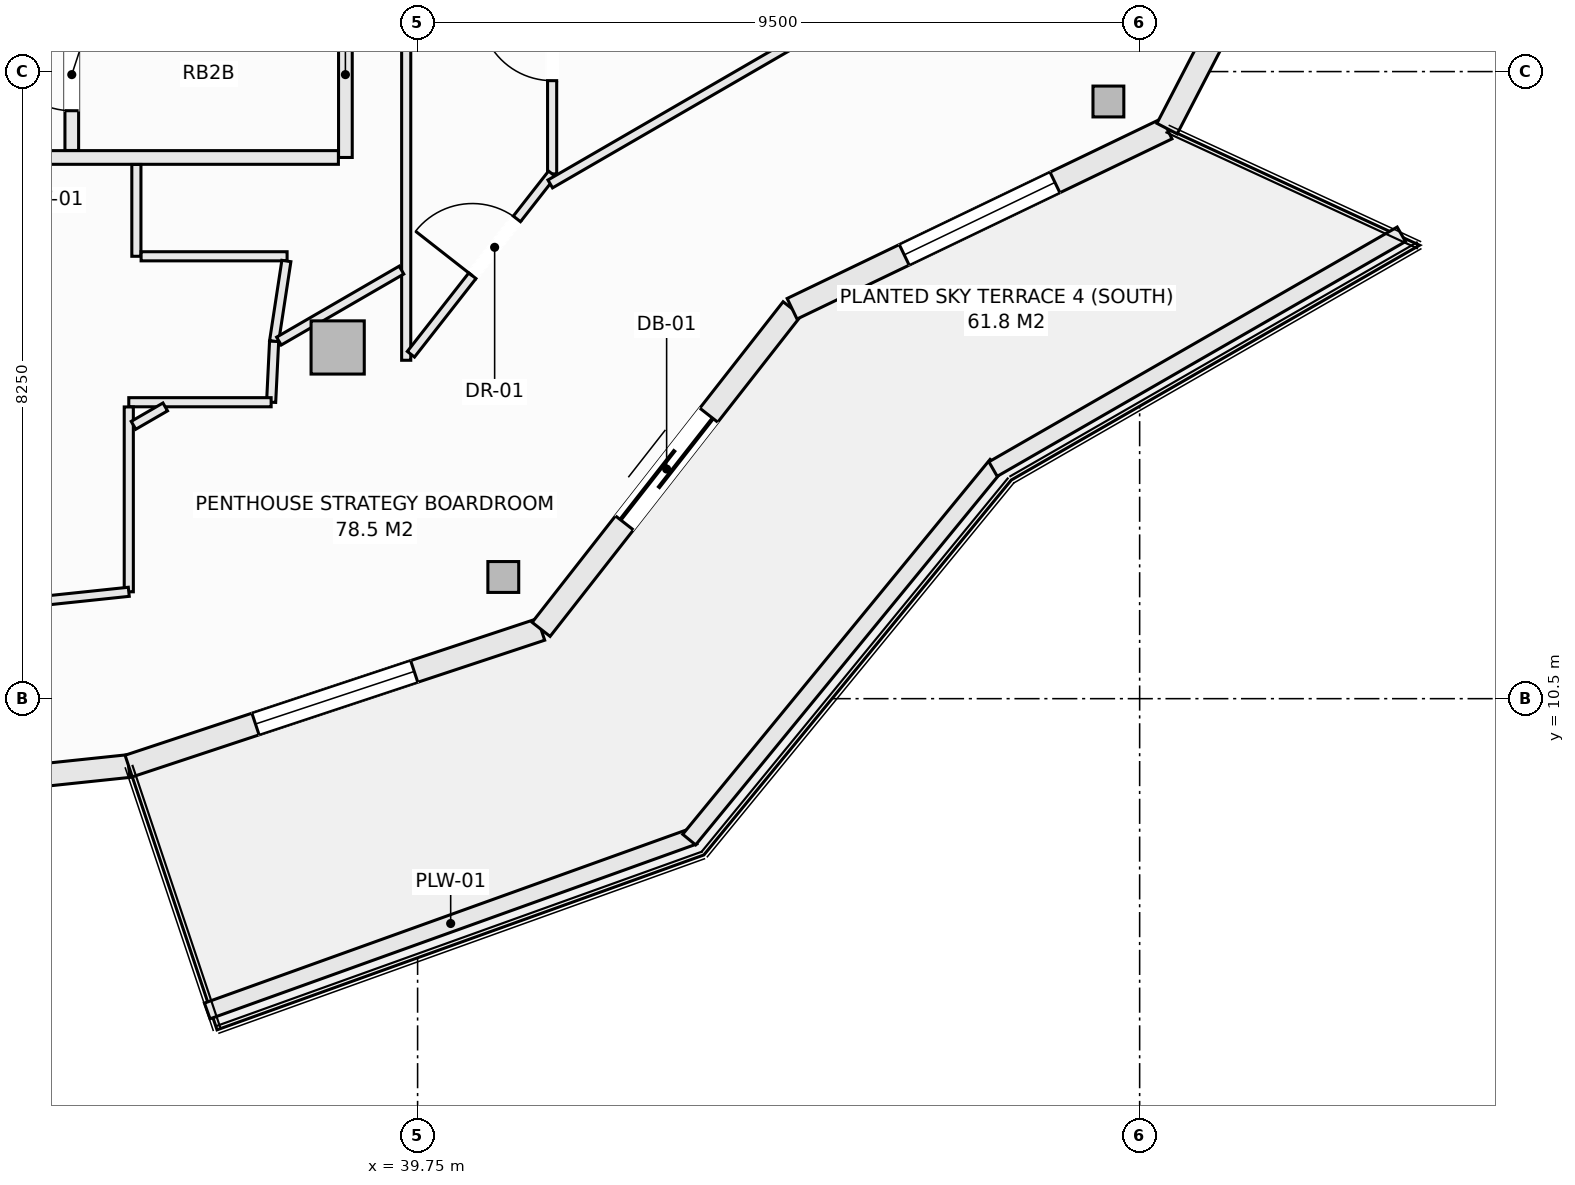
"""IFC4 building model, lengths in metres.
Left out: names, types, materials, properties, quantities, classifications, styles, units other than length and angle.
Written with IfcOpenShell. Run it as: python <this file> out.ifc"""

import sys

from ifc_helpers import new_model, si_unit, direction, frame, frame_2d, origin, origin_2d, place, context, subcontext, project, spatial, rectangle, hollow_rectangle, extrude, element, fill, save


model = new_model("IFC4")
c1 = context("Model", 3, precision=1e-05, world=origin(), true_north=direction((0.0, 1.0)))
c2 = subcontext(c1, "Body", "Model", "MODEL_VIEW")
j1 = project(units=[si_unit("LENGTHUNIT", "METRE"), si_unit("PLANEANGLEUNIT", "RADIAN")], contexts=[c1])
p1 = place(None, origin())
s1 = spatial("IfcSite", under=j1, at=p1, CompositionType="ELEMENT")
p2 = place(p1, origin())
s2 = spatial("IfcBuilding", under=s1, at=p2, CompositionType="ELEMENT")
p3 = place(p2, frame((0.0, 0.0, 249.2)))
s3 = spatial("IfcBuildingStorey", under=s2, at=p3, CompositionType="ELEMENT", Elevation=249.2)
for number, where, z_axis, x_axis in (
    (1, (40.878, 12.101, -0.27), (0.0, 0.0, 1.0), (1.0, 0.0, 0.0)),
    (2, (48.839, 18.356, -0.27), (0.0, 0.0, 1.0), (1.0, 0.0, 0.0)),
):
    element("IfcColumn", number, at=place(p3, frame(where, z_axis=z_axis, x_axis=x_axis)), inside=s3, PredefinedType="COLUMN", context=c2, shape_type="SweptSolid", body=[
        extrude(hollow_rectangle(XDim=0.406, YDim=0.406, WallThickness=0.016, at=origin_2d()), origin(), (0.0, 0.0, 1.0), 3.3),
    ])
p4 = place(p3, frame((38.698, 15.121, -0.27), z_axis=(0.0, 0.0, 1.0), x_axis=(1.0, 0.0, 0.0)))
e3 = element("IfcColumn", 3, at=p4, inside=s3, PredefinedType="COLUMN", context=c2, shape_type="SweptSolid", body=[
    extrude(rectangle(XDim=0.7, YDim=0.7, at=origin_2d()), origin(), (0.0, 0.0, 1.0), 3.3),
])
p5 = place(p3, frame((30.125, 9.0, 0.0), z_axis=(0.0, 0.0, 1.0), x_axis=(0.994500425783, 0.10473253132, 0.0)))
e4 = element("IfcWall", 4, at=p5, inside=s3, PredefinedType="SOLIDWALL", context=c2, shape_type="SweptSolid", body=[
    extrude(rectangle(XDim=5.856, YDim=0.3, at=frame_2d((2.928, 0.0))), origin(), (0.0, 0.0, 1.0), 2.605),
])
p6 = place(p5, frame((1.828, 0.0, 0.72)))
e5 = element("IfcOpeningElement", 5, at=p6, cuts=e4, PredefinedType="OPENING", context=c2, shape_type="SweptSolid", body=[
    extrude(rectangle(XDim=2.2, YDim=1.65, at=frame_2d((1.1, 0.825))), frame((0.0, 0.16, 0.0), z_axis=(0.0, -1.0, 0.0), x_axis=(1.0, 0.0, 0.0)), (0.0, 0.0, 1.0), 0.32),
])
p7 = place(p3, frame((35.948, 9.613, 0.0), z_axis=(0.0, 0.0, 1.0), x_axis=(0.949232769585, 0.314574552605, 0.0)))
e6 = element("IfcWall", 6, at=p7, inside=s3, PredefinedType="SOLIDWALL", context=c2, shape_type="SweptSolid", body=[
    extrude(rectangle(XDim=5.717, YDim=0.3, at=frame_2d((2.858, 0.0))), origin(), (0.0, 0.0, 1.0), 2.605),
])
p8 = place(p7, frame((1.758, 0.0, 0.72)))
e7 = element("IfcOpeningElement", 7, at=p8, cuts=e6, PredefinedType="OPENING", context=c2, shape_type="SweptSolid", body=[
    extrude(rectangle(XDim=2.2, YDim=1.65, at=frame_2d((1.1, 0.825))), frame((0.0, 0.16, 0.0), z_axis=(0.0, -1.0, 0.0), x_axis=(1.0, 0.0, 0.0)), (0.0, 0.0, 1.0), 0.32),
])
p9 = place(p3, frame((41.375, 11.412, 0.0), z_axis=(0.0, 0.0, 1.0), x_axis=(0.61644588519, 0.787397276241, 0.0)))
e8 = element("IfcWall", 8, at=p9, inside=s3, PredefinedType="SOLIDWALL", context=c2, shape_type="SweptSolid", body=[
    extrude(rectangle(XDim=5.357, YDim=0.3, at=frame_2d((2.678, 0.0))), origin(), (0.0, 0.0, 1.0), 2.605),
])
p10 = place(p9, frame((1.779, 0.0, 0.0)))
e9 = element("IfcOpeningElement", 9, at=p10, cuts=e8, PredefinedType="OPENING", context=c2, shape_type="SweptSolid", body=[
    extrude(rectangle(XDim=1.8, YDim=2.25, at=frame_2d((0.9, 1.125))), frame((0.0, 0.16, 0.0), z_axis=(0.0, -1.0, 0.0), x_axis=(1.0, 0.0, 0.0)), (0.0, 0.0, 1.0), 0.32),
])
p11 = place(p3, frame((44.677, 15.63, 0.0), z_axis=(0.0, 0.0, 1.0), x_axis=(0.901355238351, 0.433080517106, 0.0)))
e10 = element("IfcWall", 10, at=p11, inside=s3, PredefinedType="SOLIDWALL", context=c2, shape_type="SweptSolid", body=[
    extrude(rectangle(XDim=5.473, YDim=0.3, at=frame_2d((2.737, 0.0))), origin(), (0.0, 0.0, 1.0), 2.605),
])
p12 = place(p11, frame((1.637, 0.0, 0.72)))
e11 = element("IfcOpeningElement", 11, at=p12, cuts=e10, PredefinedType="OPENING", context=c2, shape_type="SweptSolid", body=[
    extrude(rectangle(XDim=2.2, YDim=1.65, at=frame_2d((1.1, 0.825))), frame((0.0, 0.16, 0.0), z_axis=(0.0, -1.0, 0.0), x_axis=(1.0, 0.0, 0.0)), (0.0, 0.0, 1.0), 0.32),
])
p13 = place(p3, frame((49.611, 18.0, 0.0), z_axis=(0.0, 0.0, 1.0), x_axis=(0.459793771602, 0.888025724625, 0.0)))
e12 = element("IfcWall", 12, at=p13, inside=s3, PredefinedType="SOLIDWALL", context=c2, shape_type="SweptSolid", body=[
    extrude(rectangle(XDim=4.889, YDim=0.3, at=frame_2d((2.444, 0.0))), origin(), (0.0, 0.0, 1.0), 2.605),
])
p14 = place(p13, frame((1.344, 0.0, 0.72)))
e13 = element("IfcOpeningElement", 13, at=p14, cuts=e12, PredefinedType="OPENING", context=c2, shape_type="SweptSolid", body=[
    extrude(rectangle(XDim=2.2, YDim=1.65, at=frame_2d((1.1, 0.825))), frame((0.0, 0.16, 0.0), z_axis=(0.0, -1.0, 0.0), x_axis=(1.0, 0.0, 0.0)), (0.0, 0.0, 1.0), 0.32),
])
p15 = place(p3, frame((36.982, 6.392, 0.0), z_axis=(0.0, 0.0, 1.0), x_axis=(0.941139090914, 0.338019543152, 0.0)))
e14 = element("IfcWall", 14, at=p15, inside=s3, PredefinedType="PARAPET", context=c2, shape_type="SweptSolid", body=[
    extrude(rectangle(XDim=6.807, YDim=0.22, at=frame_2d((3.403, 0.0))), origin(), (0.0, 0.0, 1.0), 0.52),
])
p16 = place(p3, frame((43.323, 8.646, 0.0), z_axis=(0.0, 0.0, 1.0), x_axis=(0.63407318032, 0.77327304492, 0.0)))
e15 = element("IfcWall", 15, at=p16, inside=s3, PredefinedType="PARAPET", context=c2, shape_type="SweptSolid", body=[
    extrude(rectangle(XDim=6.379, YDim=0.22, at=frame_2d((3.189, 0.0))), origin(), (0.0, 0.0, 1.0), 0.52),
])
p17 = place(p3, frame((47.321, 13.521, 0.0), z_axis=(0.0, 0.0, 1.0), x_axis=(0.866901621005, 0.49847926687, 0.0)))
e16 = element("IfcWall", 16, at=p17, inside=s3, PredefinedType="PARAPET", context=c2, shape_type="SweptSolid", body=[
    extrude(rectangle(XDim=6.197, YDim=0.22, at=frame_2d((3.098, 0.0))), origin(), (0.0, 0.0, 1.0), 0.52),
])
p18 = place(p3, frame((38.8, 17.62, 0.0), z_axis=(0.0, 0.0, 1.0), x_axis=(0.0, 1.0, 0.0)))
e17 = element("IfcWall", 17, at=p18, inside=s3, PredefinedType="SOLIDWALL", context=c2, shape_type="SweptSolid", body=[
    extrude(rectangle(XDim=2.18, YDim=0.18, at=frame_2d((1.09, 0.0))), origin(), (0.0, 0.0, 1.0), 3.03),
])
p19 = place(p3, frame((30.062, 17.62, 0.0), z_axis=(0.0, 0.0, 1.0), x_axis=(1.0, 0.0, 0.0)))
e18 = element("IfcWall", 18, at=p19, inside=s3, PredefinedType="SOLIDWALL", context=c2, shape_type="SweptSolid", body=[
    extrude(rectangle(XDim=8.646, YDim=0.18, at=frame_2d((4.323, 0.0))), origin(), (0.0, 0.0, 1.0), 3.03),
])
p20 = place(p19, frame((2.299, 0.0, 0.0)))
e19 = element("IfcOpeningElement", 19, at=p20, cuts=e18, PredefinedType="OPENING", context=c2, shape_type="SweptSolid", body=[
    extrude(rectangle(XDim=0.95, YDim=2.1, at=frame_2d((0.475, 1.05))), frame((0.0, 0.1, 0.0), z_axis=(0.0, -1.0, 0.0), x_axis=(1.0, 0.0, 0.0)), (0.0, 0.0, 1.0), 0.2),
])
p21 = place(p3, frame((35.2, 17.712, 0.0), z_axis=(0.0, 0.0, 1.0), x_axis=(0.0, 1.0, 0.0)))
e20 = element("IfcWall", 20, at=p21, inside=s3, PredefinedType="SOLIDWALL", context=c2, shape_type="SweptSolid", body=[
    extrude(rectangle(XDim=1.996, YDim=0.18, at=frame_2d((0.998, 0.0))), origin(), (0.0, 0.0, 1.0), 3.03),
])
p22 = place(p21, frame((0.523, 0.0, 0.0)))
e21 = element("IfcOpeningElement", 21, at=p22, cuts=e20, PredefinedType="OPENING", context=c2, shape_type="SweptSolid", body=[
    extrude(rectangle(XDim=0.95, YDim=2.1, at=frame_2d((0.475, 1.05))), frame((0.0, 0.1, 0.0), z_axis=(0.0, -1.0, 0.0), x_axis=(1.0, 0.0, 0.0)), (0.0, 0.0, 1.0), 0.2),
])
p23 = place(p3, frame((39.6, 14.952, 0.0), z_axis=(0.0, 0.0, 1.0), x_axis=(0.0, 1.0, 0.0)))
e22 = element("IfcWall", 22, at=p23, inside=s3, PredefinedType="PARTITIONING", context=c2, shape_type="SweptSolid", body=[
    extrude(rectangle(XDim=8.068, YDim=0.12, at=frame_2d((4.034, 0.0))), origin(), (0.0, 0.0, 1.0), 2.478),
])
p24 = place(p3, frame((41.52, 17.404, 0.0), z_axis=(0.0, 0.0, 1.0), x_axis=(0.0, 1.0, 0.0)))
e23 = element("IfcWall", 23, at=p24, inside=s3, PredefinedType="PARTITIONING", context=c2, shape_type="SweptSolid", body=[
    extrude(rectangle(XDim=3.403, YDim=0.12, at=frame_2d((1.701, 0.0))), origin(), (0.0, 0.0, 1.0), 3.03),
])
p25 = place(p24, frame((1.227, 0.0, 0.0)))
e24 = element("IfcOpeningElement", 24, at=p25, cuts=e23, PredefinedType="OPENING", context=c2, shape_type="SweptSolid", body=[
    extrude(rectangle(XDim=0.95, YDim=2.1, at=frame_2d((0.475, 1.05))), frame((0.0, 0.07, 0.0), z_axis=(0.0, -1.0, 0.0), x_axis=(1.0, 0.0, 0.0)), (0.0, 0.0, 1.0), 0.14),
])
p26 = place(p3, frame((39.662, 15.031, 0.0), z_axis=(0.0, 0.0, 1.0), x_axis=(0.616500468458, 0.787354540465, 0.0)))
e25 = element("IfcWall", 25, at=p26, inside=s3, PredefinedType="PARTITIONING", context=c2, shape_type="SweptSolid", body=[
    extrude(rectangle(XDim=3.014, YDim=0.12, at=frame_2d((1.507, 0.0))), origin(), (0.0, 0.0, 1.0), 3.03),
])
p27 = place(p26, frame((1.312, 0.0, 0.0)))
e26 = element("IfcOpeningElement", 26, at=p27, cuts=e25, PredefinedType="OPENING", context=c2, shape_type="SweptSolid", body=[
    extrude(rectangle(XDim=0.95, YDim=2.1, at=frame_2d((0.475, 1.05))), frame((0.0, 0.07, 0.0), z_axis=(0.0, -1.0, 0.0), x_axis=(1.0, 0.0, 0.0)), (0.0, 0.0, 1.0), 0.14),
])
p28 = place(p3, frame((36.05, 16.32, 0.0), z_axis=(0.0, 0.0, 1.0), x_axis=(0.0, 1.0, 0.0)))
e27 = element("IfcWall", 27, at=p28, inside=s3, PredefinedType="PARTITIONING", context=c2, shape_type="SweptSolid", body=[
    extrude(rectangle(XDim=1.208, YDim=0.12, at=frame_2d((0.604, 0.0))), origin(), (0.0, 0.0, 1.0), 3.03),
])
p29 = place(p3, frame((36.112, 16.32, 0.0), z_axis=(0.0, 0.0, 1.0), x_axis=(1.0, 0.0, 0.0)))
e28 = element("IfcWall", 28, at=p29, inside=s3, PredefinedType="PARTITIONING", context=c2, shape_type="SweptSolid", body=[
    extrude(rectangle(XDim=1.921, YDim=0.12, at=frame_2d((0.96, 0.0))), origin(), (0.0, 0.0, 1.0), 3.03),
])
p30 = place(p3, frame((37.862, 15.201, 0.0), z_axis=(0.0, 0.0, 1.0), x_axis=(0.150907653202, 0.988547864398, 0.0)))
e29 = element("IfcWall", 29, at=p30, inside=s3, PredefinedType="PARTITIONING", context=c2, shape_type="SweptSolid", body=[
    extrude(rectangle(XDim=1.069, YDim=0.12, at=frame_2d((0.535, 0.0))), origin(), (0.0, 0.0, 1.0), 3.03),
])
p31 = place(p3, frame((37.823, 14.4, 0.0), z_axis=(0.0, 0.0, 1.0), x_axis=(0.04870773904, 0.998813073682, 0.0)))
e30 = element("IfcWall", 30, at=p31, inside=s3, PredefinedType="PARTITIONING", context=c2, shape_type="SweptSolid", body=[
    extrude(rectangle(XDim=0.802, YDim=0.12, at=frame_2d((0.401, 0.0))), origin(), (0.0, 0.0, 1.0), 3.03),
])
p32 = place(p3, frame((35.95, 14.4, 0.0), z_axis=(0.0, 0.0, 1.0), x_axis=(1.0, 0.0, 0.0)))
e31 = element("IfcWall", 31, at=p32, inside=s3, PredefinedType="PARTITIONING", context=c2, shape_type="SweptSolid", body=[
    extrude(rectangle(XDim=1.873, YDim=0.12, at=frame_2d((0.937, 0.0))), origin(), (0.0, 0.0, 1.0), 3.03),
])
p33 = place(p3, frame((35.95, 11.906, 0.0), z_axis=(0.0, 0.0, 1.0), x_axis=(0.0, 1.0, 0.0)))
e32 = element("IfcWall", 32, at=p33, inside=s3, PredefinedType="PARTITIONING", context=c2, shape_type="SweptSolid", body=[
    extrude(rectangle(XDim=2.432, YDim=0.12, at=frame_2d((1.216, 0.0))), origin(), (0.0, 0.0, 1.0), 3.03),
])
p34 = place(p3, frame((34.468, 11.75, 0.0), z_axis=(0.0, 0.0, 1.0), x_axis=(0.994504555135, 0.104693313135, 0.0)))
e33 = element("IfcWall", 33, at=p34, inside=s3, PredefinedType="PARTITIONING", context=c2, shape_type="SweptSolid", body=[
    extrude(rectangle(XDim=1.49, YDim=0.12, at=frame_2d((0.745, 0.0))), origin(), (0.0, 0.0, 1.0), 3.03),
])
p35 = place(p3, frame((36.012, 14.096, 0.0), z_axis=(0.0, 0.0, 1.0), x_axis=(0.865553251364, 0.500816901724, 0.0)))
e34 = element("IfcWall", 34, at=p35, inside=s3, PredefinedType="PARTITIONING", context=c2, shape_type="SweptSolid", body=[
    extrude(rectangle(XDim=0.483, YDim=0.12, at=frame_2d((0.241, 0.0))), origin(), (0.0, 0.0, 1.0), 3.03),
])
p36 = place(p3, frame((37.925, 15.204, 0.0), z_axis=(0.0, 0.0, 1.0), x_axis=(0.865342568062, 0.501180845505, 0.0)))
e35 = element("IfcWall", 35, at=p36, inside=s3, PredefinedType="PARTITIONING", context=c2, shape_type="SweptSolid", body=[
    extrude(rectangle(XDim=1.864, YDim=0.12, at=frame_2d((0.932, 0.0))), origin(), (0.0, 0.0, 1.0), 2.478),
])
p37 = place(p3, frame((41.495, 17.272, 0.0), z_axis=(0.0, 0.0, 1.0), x_axis=(0.865359277242, 0.501151994201, 0.0)))
e36 = element("IfcWall", 36, at=p37, inside=s3, PredefinedType="PARTITIONING", context=c2, shape_type="SweptSolid", body=[
    extrude(rectangle(XDim=11.975, YDim=0.12, at=frame_2d((5.987, 0.0))), origin(), (0.0, 0.0, 1.0), 3.03),
])
p38 = place(p8, origin())
e37 = element("IfcWindow", 37, at=p38, inside=s3, PartitioningType="SINGLE_PANEL", PredefinedType="WINDOW", context=c2, shape_type="SweptSolid", body=[
    extrude(rectangle(XDim=2.2, YDim=1.65, at=frame_2d((1.1, 0.825))), frame((0.0, 0.03, 0.0), z_axis=(0.0, -1.0, 0.0), x_axis=(1.0, 0.0, 0.0)), (0.0, 0.0, 1.0), 0.06),
])
fill(e7, e37)
p39 = place(p10, frame((1.8, 0.0, 0.0), z_axis=(0.0, 0.0, 1.0), x_axis=(-1.0, 0.0, 0.0)))
e38 = element("IfcDoor", 38, at=p39, inside=s3, OperationType="SLIDING_TO_LEFT", PredefinedType="DOOR", context=c2, shape_type="SweptSolid", body=[
    extrude(rectangle(XDim=1.8, YDim=2.25, at=frame_2d((0.9, 1.125))), frame((0.0, 0.025, 0.0), z_axis=(0.0, -1.0, 0.0), x_axis=(1.0, 0.0, 0.0)), (0.0, 0.0, 1.0), 0.05),
])
fill(e9, e38)
p40 = place(p12, origin())
e39 = element("IfcWindow", 39, at=p40, inside=s3, PartitioningType="SINGLE_PANEL", PredefinedType="WINDOW", context=c2, shape_type="SweptSolid", body=[
    extrude(rectangle(XDim=2.2, YDim=1.65, at=frame_2d((1.1, 0.825))), frame((0.0, 0.03, 0.0), z_axis=(0.0, -1.0, 0.0), x_axis=(1.0, 0.0, 0.0)), (0.0, 0.0, 1.0), 0.06),
])
fill(e11, e39)
p41 = place(p27, origin())
e40 = element("IfcDoor", 40, at=p41, inside=s3, OperationType="SINGLE_SWING_LEFT", PredefinedType="DOOR", context=c2, shape_type="SweptSolid", body=[
    extrude(rectangle(XDim=0.95, YDim=2.1, at=frame_2d((0.475, 1.05))), frame((0.0, 0.025, 0.0), z_axis=(0.0, -1.0, 0.0), x_axis=(1.0, 0.0, 0.0)), (0.0, 0.0, 1.0), 0.05),
])
fill(e26, e40)
p42 = place(p25, origin())
e41 = element("IfcDoor", 41, at=p42, inside=s3, OperationType="SINGLE_SWING_RIGHT", PredefinedType="DOOR", context=c2, shape_type="SweptSolid", body=[
    extrude(rectangle(XDim=0.95, YDim=2.1, at=frame_2d((0.475, 1.05))), frame((0.0, 0.025, 0.0), z_axis=(0.0, -1.0, 0.0), x_axis=(1.0, 0.0, 0.0)), (0.0, 0.0, 1.0), 0.05),
])
fill(e24, e41)
p43 = place(p22, origin())
e42 = element("IfcDoor", 42, at=p43, inside=s3, OperationType="SINGLE_SWING_RIGHT", PredefinedType="DOOR", context=c2, shape_type="SweptSolid", body=[
    extrude(rectangle(XDim=0.95, YDim=2.1, at=frame_2d((0.475, 1.05))), frame((0.0, 0.025, 0.0), z_axis=(0.0, -1.0, 0.0), x_axis=(1.0, 0.0, 0.0)), (0.0, 0.0, 1.0), 0.05),
])
fill(e21, e42)
save(model, sys.argv[1])
